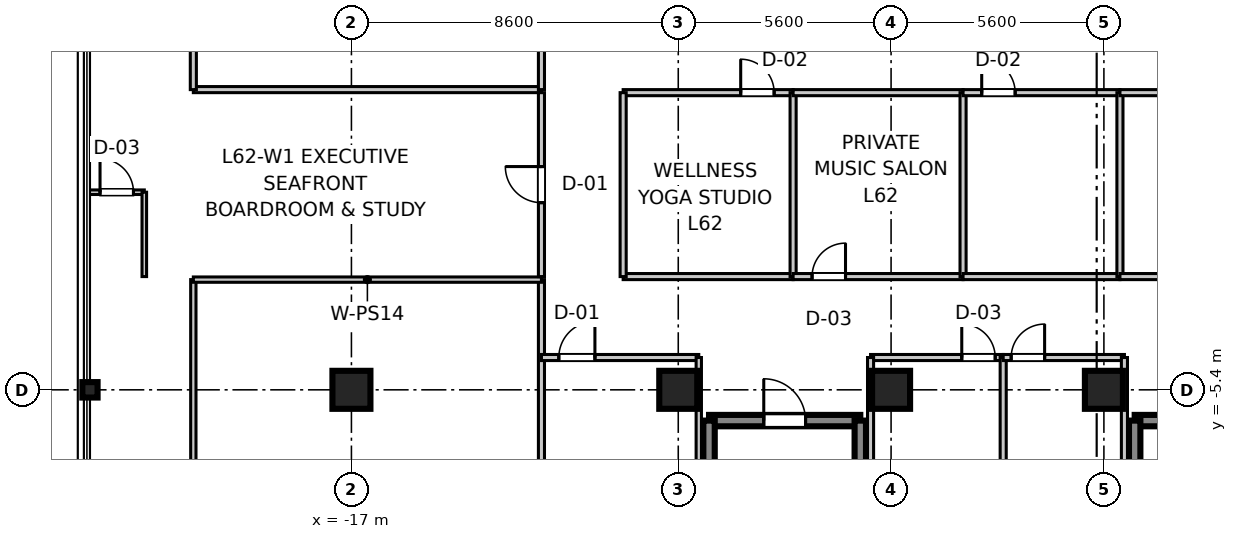
"""IFC4 building model, lengths in metres.
Left out: names, types, materials, properties, quantities, classifications, styles, units other than length and angle.
Written with IfcOpenShell. Run it as: python <this file> out.ifc"""

import sys

from ifc_helpers import new_model, si_unit, direction, frame, frame_2d, origin, origin_2d, place, context, subcontext, project, spatial, rectangle, i_section, extrude, source, transform, mapped, element, fill, save


model = new_model("IFC4")
c1 = context("Model", 3, precision=1e-05, world=origin(), true_north=direction((0.0, 1.0)))
c2 = subcontext(c1, "Body", "Model", "MODEL_VIEW")
j1 = project(units=[si_unit("LENGTHUNIT", "METRE"), si_unit("PLANEANGLEUNIT", "RADIAN")], contexts=[c1])
p1 = place(None, origin())
s1 = spatial("IfcSite", under=j1, at=p1, CompositionType="ELEMENT")
p2 = place(p1, origin())
s2 = spatial("IfcBuilding", under=s1, at=p2, CompositionType="ELEMENT")
p3 = place(p2, frame((0.0, 0.0, 241.9)))
s3 = spatial("IfcBuildingStorey", under=s2, at=p3, CompositionType="ELEMENT", Elevation=241.9)
m1 = source(origin(), c2, "Body", "SweptSolid", [
    extrude(rectangle(XDim=1.0, YDim=1.0, at=origin_2d()), origin(), (0.0, 0.0, 1.0), 3.655),
])
for number, where, z_axis, x_axis in (
    (1, (-17.0, -5.4, 0.0), (0.0, 0.0, 1.0), (1.0, 0.0, 0.0)),
    (2, (-8.4, -5.4, 0.0), (0.0, 0.0, 1.0), (1.0, 0.0, 0.0)),
    (3, (-2.8, -5.4, 0.0), (0.0, 0.0, 1.0), (1.0, 0.0, 0.0)),
    (4, (2.8, -5.4, 0.0), (0.0, 0.0, 1.0), (1.0, 0.0, 0.0)),
):
    element("IfcColumn", number, at=place(p3, frame(where, z_axis=z_axis, x_axis=x_axis)), inside=s3, PredefinedType="COLUMN", context=c2, shape_type="MappedRepresentation", body=[
        mapped(m1, transform((0.0, 0.0, 0.0), scale=1.0)),
    ])
m2 = source(origin(), c2, "Body", "SweptSolid", [
    extrude(i_section(OverallWidth=0.401, OverallDepth=0.406, WebThickness=0.016, FlangeThickness=0.025, at=origin_2d()), origin(), (0.0, 0.0, 1.0), 3.655),
])
p4 = place(p3, frame((-23.88, -5.4, 0.0), z_axis=(0.0, 0.0, 1.0), x_axis=(1.0, 0.0, 0.0)))
e5 = element("IfcColumn", 5, at=p4, inside=s3, PredefinedType="COLUMN", context=c2, shape_type="MappedRepresentation", body=[
    mapped(m2, transform((0.0, 0.0, 0.0), scale=1.0)),
])
m3 = source(origin(), c2, "Body", "SweptSolid", [
    extrude(rectangle(XDim=3.98, YDim=0.3, at=frame_2d((1.99, 0.0))), origin(), (0.0, 0.0, 1.0), 3.41),
])
p5 = place(p3, frame((3.61, -6.21, 0.0), z_axis=(0.0, 0.0, 1.0), x_axis=(1.0, 0.0, 0.0)))
e6 = element("IfcWall", 6, at=p5, inside=s3, PredefinedType="SHEAR", context=c2, shape_type="MappedRepresentation", body=[
    mapped(m3, transform((0.0, 0.0, 0.0), scale=1.0)),
])
m4 = source(origin(), c2, "Body", "SweptSolid", [
    extrude(rectangle(XDim=9.38, YDim=0.3, at=frame_2d((4.69, 0.0))), origin(), (0.0, 0.0, 1.0), 3.41),
])
p6 = place(p3, frame((3.61, -15.59, 0.0), z_axis=(0.0, 0.0, 1.0), x_axis=(0.0, 1.0, 0.0)))
e7 = element("IfcWall", 7, at=p6, inside=s3, PredefinedType="SHEAR", context=c2, shape_type="MappedRepresentation", body=[
    mapped(m4, transform((0.0, 0.0, 0.0), scale=1.0)),
])
p7 = place(p3, frame((-7.59, -6.21, 0.0), z_axis=(0.0, 0.0, 1.0), x_axis=(1.0, 0.0, 0.0)))
e8 = element("IfcWall", 8, at=p7, inside=s3, PredefinedType="SHEAR", context=c2, shape_type="MappedRepresentation", body=[
    mapped(m3, transform((0.0, 0.0, 0.0), scale=1.0)),
])
p8 = place(p7, frame((1.44, 0.0, 0.0)))
e9 = element("IfcOpeningElement", 9, at=p8, cuts=e8, PredefinedType="OPENING", context=c2, shape_type="SweptSolid", body=[
    extrude(rectangle(XDim=1.1, YDim=2.15, at=frame_2d((0.55, 1.075))), frame((0.0, 0.16, 0.0), z_axis=(0.0, -1.0, 0.0), x_axis=(1.0, 0.0, 0.0)), (0.0, 0.0, 1.0), 0.32),
])
for number, where, z_axis, x_axis in (
    (10, (-7.59, -15.59, 0.0), (0.0, 0.0, 1.0), (0.0, 1.0, 0.0)),
    (11, (-3.61, -15.59, 0.0), (0.0, 0.0, 1.0), (0.0, 1.0, 0.0)),
):
    element("IfcWall", number, at=place(p3, frame(where, z_axis=z_axis, x_axis=x_axis)), inside=s3, PredefinedType="SHEAR", context=c2, shape_type="MappedRepresentation", body=[
        mapped(m4, transform((0.0, 0.0, 0.0), scale=1.0)),
    ])
m5 = source(origin(), c2, "Body", "SweptSolid", [
    extrude(rectangle(XDim=9.16, YDim=0.16, at=frame_2d((4.58, 0.0))), origin(), (0.0, 0.0, 1.0), 2.75),
])
p9 = place(p3, frame((-21.16, 2.5, 0.0), z_axis=(0.0, 0.0, 1.0), x_axis=(1.0, 0.0, 0.0)))
e12 = element("IfcWall", 12, at=p9, inside=s3, PredefinedType="PARTITIONING", context=c2, shape_type="MappedRepresentation", body=[
    mapped(m5, transform((0.0, 0.0, 0.0), scale=1.0)),
])
m6 = source(origin(), c2, "Body", "SweptSolid", [
    extrude(rectangle(XDim=10.7, YDim=0.16, at=frame_2d((5.35, 0.0))), origin(), (0.0, 0.0, 1.0), 2.75),
])
p10 = place(p3, frame((-21.16, 2.5, 0.0), z_axis=(0.0, 0.0, 1.0), x_axis=(0.0, 1.0, 0.0)))
e13 = element("IfcWall", 13, at=p10, inside=s3, PredefinedType="PARTITIONING", context=c2, shape_type="MappedRepresentation", body=[
    mapped(m6, transform((0.0, 0.0, 0.0), scale=1.0)),
])
p11 = place(p3, frame((-12.0, 2.5, 0.0), z_axis=(0.0, 0.0, 1.0), x_axis=(0.0, 1.0, 0.0)))
e14 = element("IfcWall", 14, at=p11, inside=s3, PredefinedType="PARTITIONING", context=c2, shape_type="MappedRepresentation", body=[
    mapped(m6, transform((0.0, 0.0, 0.0), scale=1.0)),
])
p12 = place(p11, frame((4.91, 0.0, 0.0)))
e15 = element("IfcOpeningElement", 15, at=p12, cuts=e14, PredefinedType="OPENING", context=c2, shape_type="SweptSolid", body=[
    extrude(rectangle(XDim=0.88, YDim=2.1, at=frame_2d((0.44, 1.05))), frame((0.0, 0.09, 0.0), z_axis=(0.0, -1.0, 0.0), x_axis=(1.0, 0.0, 0.0)), (0.0, 0.0, 1.0), 0.18),
])
m7 = source(origin(), c2, "Body", "SweptSolid", [
    extrude(rectangle(XDim=21.4, YDim=0.16, at=frame_2d((10.7, 0.0))), origin(), (0.0, 0.0, 1.0), 2.75),
])
p13 = place(p3, frame((-12.0, -23.9, 0.0), z_axis=(0.0, 0.0, 1.0), x_axis=(0.0, 1.0, 0.0)))
e16 = element("IfcWall", 16, at=p13, inside=s3, PredefinedType="PARTITIONING", context=c2, shape_type="MappedRepresentation", body=[
    mapped(m7, transform((0.0, 0.0, 0.0), scale=1.0)),
])
p14 = place(p13, frame((12.3, 0.0, 0.0)))
e17 = element("IfcOpeningElement", 17, at=p14, cuts=e16, PredefinedType="OPENING", context=c2, shape_type="SweptSolid", body=[
    extrude(rectangle(XDim=0.95, YDim=2.1, at=frame_2d((0.475, 1.05))), frame((0.0, 0.09, 0.0), z_axis=(0.0, -1.0, 0.0), x_axis=(1.0, 0.0, 0.0)), (0.0, 0.0, 1.0), 0.18),
])
m8 = source(origin(), c2, "Body", "SweptSolid", [
    extrude(rectangle(XDim=19.98, YDim=0.14, at=frame_2d((9.99, 0.0))), origin(), (0.0, 0.0, 1.0), 2.75),
])
p15 = place(p3, frame((-21.16, -22.48, 0.0), z_axis=(0.0, 0.0, 1.0), x_axis=(0.0, 1.0, 0.0)))
e18 = element("IfcWall", 18, at=p15, inside=s3, PredefinedType="PARTITIONING", context=c2, shape_type="MappedRepresentation", body=[
    mapped(m8, transform((0.0, 0.0, 0.0), scale=1.0)),
])
m9 = source(origin(), c2, "Body", "SweptSolid", [
    extrude(rectangle(XDim=9.16, YDim=0.14, at=frame_2d((4.58, 0.0))), origin(), (0.0, 0.0, 1.0), 2.75),
])
p16 = place(p3, frame((-21.16, -2.5, 0.0), z_axis=(0.0, 0.0, 1.0), x_axis=(1.0, 0.0, 0.0)))
e19 = element("IfcWall", 19, at=p16, inside=s3, PredefinedType="PARTITIONING", context=c2, shape_type="MappedRepresentation", body=[
    mapped(m9, transform((0.0, 0.0, 0.0), scale=1.0)),
])
m10 = source(origin(), c2, "Body", "SweptSolid", [
    extrude(rectangle(XDim=4.14, YDim=0.16, at=frame_2d((2.07, 0.0))), origin(), (0.0, 0.0, 1.0), 2.75),
])
p17 = place(p3, frame((-12.0, -4.55, 0.0), z_axis=(0.0, 0.0, 1.0), x_axis=(1.0, 0.0, 0.0)))
e20 = element("IfcWall", 20, at=p17, inside=s3, PredefinedType="PARTITIONING", context=c2, shape_type="MappedRepresentation", body=[
    mapped(m10, transform((0.0, 0.0, 0.0), scale=1.0)),
])
p18 = place(p17, frame((0.457, 0.0, 0.0)))
e21 = element("IfcOpeningElement", 21, at=p18, cuts=e20, PredefinedType="OPENING", context=c2, shape_type="SweptSolid", body=[
    extrude(rectangle(XDim=0.95, YDim=2.1, at=frame_2d((0.475, 1.05))), frame((0.0, 0.09, 0.0), z_axis=(0.0, -1.0, 0.0), x_axis=(1.0, 0.0, 0.0)), (0.0, 0.0, 1.0), 0.18),
])
m11 = source(origin(), c2, "Body", "SweptSolid", [
    extrude(rectangle(XDim=19.35, YDim=0.14, at=frame_2d((9.675, 0.0))), origin(), (0.0, 0.0, 1.0), 2.75),
])
p19 = place(p3, frame((-7.86, -23.9, 0.0), z_axis=(0.0, 0.0, 1.0), x_axis=(0.0, 1.0, 0.0)))
e22 = element("IfcWall", 22, at=p19, inside=s3, PredefinedType="PARTITIONING", context=c2, shape_type="MappedRepresentation", body=[
    mapped(m11, transform((0.0, 0.0, 0.0), scale=1.0)),
])
m12 = source(origin(), c2, "Body", "SweptSolid", [
    extrude(rectangle(XDim=3.49, YDim=0.16, at=frame_2d((1.745, 0.0))), origin(), (0.0, 0.0, 1.0), 2.75),
])
p20 = place(p3, frame((-3.34, -4.55, 0.0), z_axis=(0.0, 0.0, 1.0), x_axis=(1.0, 0.0, 0.0)))
e23 = element("IfcWall", 23, at=p20, inside=s3, PredefinedType="PARTITIONING", context=c2, shape_type="MappedRepresentation", body=[
    mapped(m12, transform((0.0, 0.0, 0.0), scale=1.0)),
])
p21 = place(p20, frame((2.4, 0.0, 0.0)))
e24 = element("IfcOpeningElement", 24, at=p21, cuts=e23, PredefinedType="OPENING", context=c2, shape_type="SweptSolid", body=[
    extrude(rectangle(XDim=0.88, YDim=2.1, at=frame_2d((0.44, 1.05))), frame((0.0, 0.09, 0.0), z_axis=(0.0, -1.0, 0.0), x_axis=(1.0, 0.0, 0.0)), (0.0, 0.0, 1.0), 0.18),
])
m13 = source(origin(), c2, "Body", "SweptSolid", [
    extrude(rectangle(XDim=19.35, YDim=0.16, at=frame_2d((9.675, 0.0))), origin(), (0.0, 0.0, 1.0), 2.75),
])
for number, where, z_axis, x_axis in (
    (25, (-3.34, -23.9, 0.0), (0.0, 0.0, 1.0), (0.0, 1.0, 0.0)),
    (26, (0.15, -23.9, 0.0), (0.0, 0.0, 1.0), (0.0, 1.0, 0.0)),
):
    element("IfcWall", number, at=place(p3, frame(where, z_axis=z_axis, x_axis=x_axis)), inside=s3, PredefinedType="PARTITIONING", context=c2, shape_type="MappedRepresentation", body=[
        mapped(m13, transform((0.0, 0.0, 0.0), scale=1.0)),
    ])
m14 = source(origin(), c2, "Body", "SweptSolid", [
    extrude(rectangle(XDim=3.19, YDim=0.16, at=frame_2d((1.595, 0.0))), origin(), (0.0, 0.0, 1.0), 2.75),
])
p22 = place(p3, frame((0.15, -4.55, 0.0), z_axis=(0.0, 0.0, 1.0), x_axis=(1.0, 0.0, 0.0)))
e27 = element("IfcWall", 27, at=p22, inside=s3, PredefinedType="PARTITIONING", context=c2, shape_type="MappedRepresentation", body=[
    mapped(m14, transform((0.0, 0.0, 0.0), scale=1.0)),
])
p23 = place(p22, frame((0.21, 0.0, 0.0)))
e28 = element("IfcOpeningElement", 28, at=p23, cuts=e27, PredefinedType="OPENING", context=c2, shape_type="SweptSolid", body=[
    extrude(rectangle(XDim=0.88, YDim=2.1, at=frame_2d((0.44, 1.05))), frame((0.0, 0.09, 0.0), z_axis=(0.0, -1.0, 0.0), x_axis=(1.0, 0.0, 0.0)), (0.0, 0.0, 1.0), 0.18),
])
p24 = place(p3, frame((3.34, -23.9, 0.0), z_axis=(0.0, 0.0, 1.0), x_axis=(0.0, 1.0, 0.0)))
e29 = element("IfcWall", 29, at=p24, inside=s3, PredefinedType="PARTITIONING", context=c2, shape_type="MappedRepresentation", body=[
    mapped(m13, transform((0.0, 0.0, 0.0), scale=1.0)),
])
m15 = source(origin(), c2, "Body", "SweptSolid", [
    extrude(rectangle(XDim=4.84, YDim=0.16, at=frame_2d((2.42, 0.0))), origin(), (0.0, 0.0, 1.0), 2.75),
])
p25 = place(p3, frame((-12.0, -2.42, 0.0), z_axis=(0.0, 0.0, 1.0), x_axis=(0.0, 1.0, 0.0)))
e30 = element("IfcWall", 30, at=p25, inside=s3, PredefinedType="PARTITIONING", context=c2, shape_type="MappedRepresentation", body=[
    mapped(m15, transform((0.0, 0.0, 0.0), scale=1.0)),
])
p26 = place(p25, frame((1.945, 0.0, 0.0)))
e31 = element("IfcOpeningElement", 31, at=p26, cuts=e30, PredefinedType="OPENING", context=c2, shape_type="SweptSolid", body=[
    extrude(rectangle(XDim=0.95, YDim=2.1, at=frame_2d((0.475, 1.05))), frame((0.0, 0.09, 0.0), z_axis=(0.0, -1.0, 0.0), x_axis=(1.0, 0.0, 0.0)), (0.0, 0.0, 1.0), 0.18),
])
m16 = source(origin(), c2, "Body", "SweptSolid", [
    extrude(rectangle(XDim=1.45, YDim=0.12, at=frame_2d((0.725, 0.0))), origin(), (0.0, 0.0, 1.0), 2.75),
])
p27 = place(p3, frame((-23.9, -0.2, 0.0), z_axis=(0.0, 0.0, 1.0), x_axis=(1.0, 0.0, 0.0)))
e32 = element("IfcWall", 32, at=p27, inside=s3, PredefinedType="PARTITIONING", context=c2, shape_type="MappedRepresentation", body=[
    mapped(m16, transform((0.0, 0.0, 0.0), scale=1.0)),
])
p28 = place(p27, frame((0.285, 0.0, 0.0)))
e33 = element("IfcOpeningElement", 33, at=p28, cuts=e32, PredefinedType="OPENING", context=c2, shape_type="SweptSolid", body=[
    extrude(rectangle(XDim=0.88, YDim=2.1, at=frame_2d((0.44, 1.05))), frame((0.0, 0.07, 0.0), z_axis=(0.0, -1.0, 0.0), x_axis=(1.0, 0.0, 0.0)), (0.0, 0.0, 1.0), 0.14),
])
m17 = source(origin(), c2, "Body", "SweptSolid", [
    extrude(rectangle(XDim=2.22, YDim=0.12, at=frame_2d((1.11, 0.0))), origin(), (0.0, 0.0, 1.0), 2.75),
])
p29 = place(p3, frame((-22.45, -2.42, 0.0), z_axis=(0.0, 0.0, 1.0), x_axis=(0.0, 1.0, 0.0)))
e34 = element("IfcWall", 34, at=p29, inside=s3, PredefinedType="PARTITIONING", context=c2, shape_type="MappedRepresentation", body=[
    mapped(m17, transform((0.0, 0.0, 0.0), scale=1.0)),
])
m18 = source(origin(), c2, "Body", "SweptSolid", [
    extrude(rectangle(XDim=4.472, YDim=0.16, at=frame_2d((2.236, 0.0))), origin(), (0.0, 0.0, 1.0), 2.75),
])
p30 = place(p3, frame((-9.85, -2.42, 0.0), z_axis=(0.0, 0.0, 1.0), x_axis=(1.0, 0.0, 0.0)))
e35 = element("IfcWall", 35, at=p30, inside=s3, PredefinedType="PARTITIONING", context=c2, shape_type="MappedRepresentation", body=[
    mapped(m18, transform((0.0, 0.0, 0.0), scale=1.0)),
])
p31 = place(p3, frame((-9.85, 2.42, 0.0), z_axis=(0.0, 0.0, 1.0), x_axis=(1.0, 0.0, 0.0)))
e36 = element("IfcWall", 36, at=p31, inside=s3, PredefinedType="PARTITIONING", context=c2, shape_type="MappedRepresentation", body=[
    mapped(m18, transform((0.0, 0.0, 0.0), scale=1.0)),
])
p32 = place(p31, frame((3.093, 0.0, 0.0)))
e37 = element("IfcOpeningElement", 37, at=p32, cuts=e36, PredefinedType="OPENING", context=c2, shape_type="SweptSolid", body=[
    extrude(rectangle(XDim=0.88, YDim=2.1, at=frame_2d((0.44, 1.05))), frame((0.0, 0.09, 0.0), z_axis=(0.0, -1.0, 0.0), x_axis=(1.0, 0.0, 0.0)), (0.0, 0.0, 1.0), 0.18),
])
for number, where, z_axis, x_axis in (
    (38, (-9.85, -2.42, 0.0), (0.0, 0.0, 1.0), (0.0, 1.0, 0.0)),
    (39, (-5.378, -2.42, 0.0), (0.0, 0.0, 1.0), (0.0, 1.0, 0.0)),
):
    element("IfcWall", number, at=place(p3, frame(where, z_axis=z_axis, x_axis=x_axis)), inside=s3, PredefinedType="PARTITIONING", context=c2, shape_type="MappedRepresentation", body=[
        mapped(m15, transform((0.0, 0.0, 0.0), scale=1.0)),
    ])
m19 = source(origin(), c2, "Body", "SweptSolid", [
    extrude(rectangle(XDim=4.472, YDim=0.16, at=frame_2d((2.236, 0.0))), origin(), (0.0, 0.0, 1.0), 2.75),
])
p33 = place(p3, frame((-5.378, -2.42, 0.0), z_axis=(0.0, 0.0, 1.0), x_axis=(1.0, 0.0, 0.0)))
e40 = element("IfcWall", 40, at=p33, inside=s3, PredefinedType="PARTITIONING", context=c2, shape_type="MappedRepresentation", body=[
    mapped(m19, transform((0.0, 0.0, 0.0), scale=1.0)),
])
p34 = place(p33, frame((0.499, 0.0, 0.0)))
e41 = element("IfcOpeningElement", 41, at=p34, cuts=e40, PredefinedType="OPENING", context=c2, shape_type="SweptSolid", body=[
    extrude(rectangle(XDim=0.88, YDim=2.1, at=frame_2d((0.44, 1.05))), frame((0.0, 0.09, 0.0), z_axis=(0.0, -1.0, 0.0), x_axis=(1.0, 0.0, 0.0)), (0.0, 0.0, 1.0), 0.18),
])
p35 = place(p3, frame((-5.378, 2.42, 0.0), z_axis=(0.0, 0.0, 1.0), x_axis=(1.0, 0.0, 0.0)))
e42 = element("IfcWall", 42, at=p35, inside=s3, PredefinedType="PARTITIONING", context=c2, shape_type="MappedRepresentation", body=[
    mapped(m19, transform((0.0, 0.0, 0.0), scale=1.0)),
])
p36 = place(p3, frame((-0.906, -2.42, 0.0), z_axis=(0.0, 0.0, 1.0), x_axis=(0.0, 1.0, 0.0)))
e43 = element("IfcWall", 43, at=p36, inside=s3, PredefinedType="PARTITIONING", context=c2, shape_type="MappedRepresentation", body=[
    mapped(m15, transform((0.0, 0.0, 0.0), scale=1.0)),
])
m20 = source(origin(), c2, "Body", "SweptSolid", [
    extrude(rectangle(XDim=4.128, YDim=0.16, at=frame_2d((2.064, 0.0))), origin(), (0.0, 0.0, 1.0), 2.75),
])
p37 = place(p3, frame((-0.906, -2.42, 0.0), z_axis=(0.0, 0.0, 1.0), x_axis=(1.0, 0.0, 0.0)))
e44 = element("IfcWall", 44, at=p37, inside=s3, PredefinedType="PARTITIONING", context=c2, shape_type="MappedRepresentation", body=[
    mapped(m20, transform((0.0, 0.0, 0.0), scale=1.0)),
])
p38 = place(p3, frame((-0.906, 2.42, 0.0), z_axis=(0.0, 0.0, 1.0), x_axis=(1.0, 0.0, 0.0)))
e45 = element("IfcWall", 45, at=p38, inside=s3, PredefinedType="PARTITIONING", context=c2, shape_type="MappedRepresentation", body=[
    mapped(m20, transform((0.0, 0.0, 0.0), scale=1.0)),
])
p39 = place(p38, frame((0.491, 0.0, 0.0)))
e46 = element("IfcOpeningElement", 46, at=p39, cuts=e45, PredefinedType="OPENING", context=c2, shape_type="SweptSolid", body=[
    extrude(rectangle(XDim=0.88, YDim=2.1, at=frame_2d((0.44, 1.05))), frame((0.0, 0.09, 0.0), z_axis=(0.0, -1.0, 0.0), x_axis=(1.0, 0.0, 0.0)), (0.0, 0.0, 1.0), 0.18),
])
p40 = place(p3, frame((3.222, -2.42, 0.0), z_axis=(0.0, 0.0, 1.0), x_axis=(0.0, 1.0, 0.0)))
e47 = element("IfcWall", 47, at=p40, inside=s3, PredefinedType="PARTITIONING", context=c2, shape_type="MappedRepresentation", body=[
    mapped(m15, transform((0.0, 0.0, 0.0), scale=1.0)),
])
m21 = source(origin(), c2, "Body", "SweptSolid", [
    extrude(rectangle(XDim=4.128, YDim=0.16, at=frame_2d((2.064, 0.0))), origin(), (0.0, 0.0, 1.0), 2.75),
])
p41 = place(p3, frame((3.222, -2.42, 0.0), z_axis=(0.0, 0.0, 1.0), x_axis=(1.0, 0.0, 0.0)))
e48 = element("IfcWall", 48, at=p41, inside=s3, PredefinedType="PARTITIONING", context=c2, shape_type="MappedRepresentation", body=[
    mapped(m21, transform((0.0, 0.0, 0.0), scale=1.0)),
])
p42 = place(p41, frame((1.933, 0.0, 0.0)))
e49 = element("IfcOpeningElement", 49, at=p42, cuts=e48, PredefinedType="OPENING", context=c2, shape_type="SweptSolid", body=[
    extrude(rectangle(XDim=0.88, YDim=2.1, at=frame_2d((0.44, 1.05))), frame((0.0, 0.09, 0.0), z_axis=(0.0, -1.0, 0.0), x_axis=(1.0, 0.0, 0.0)), (0.0, 0.0, 1.0), 0.18),
])
p43 = place(p3, frame((3.222, 2.42, 0.0), z_axis=(0.0, 0.0, 1.0), x_axis=(1.0, 0.0, 0.0)))
e50 = element("IfcWall", 50, at=p43, inside=s3, PredefinedType="PARTITIONING", context=c2, shape_type="MappedRepresentation", body=[
    mapped(m21, transform((0.0, 0.0, 0.0), scale=1.0)),
])
m22 = source(origin(), c2, "Body", "SweptSolid", [
    extrude(rectangle(XDim=1.1, YDim=2.15, at=frame_2d((0.55, 1.075))), frame((0.0, 0.025, 0.0), z_axis=(0.0, -1.0, 0.0), x_axis=(1.0, 0.0, 0.0)), (0.0, 0.0, 1.0), 0.05),
])
p44 = place(p8, frame((1.1, 0.0, 0.0), z_axis=(0.0, 0.0, 1.0), x_axis=(-1.0, 0.0, 0.0)))
e51 = element("IfcDoor", 51, at=p44, inside=s3, OperationType="SINGLE_SWING_LEFT", PredefinedType="DOOR", context=c2, shape_type="MappedRepresentation", body=[
    mapped(m22, transform((0.0, 0.0, 0.0), scale=1.0)),
])
fill(e9, e51)
m23 = source(origin(), c2, "Body", "SweptSolid", [
    extrude(rectangle(XDim=0.95, YDim=2.1, at=frame_2d((0.475, 1.05))), frame((0.0, 0.025, 0.0), z_axis=(0.0, -1.0, 0.0), x_axis=(1.0, 0.0, 0.0)), (0.0, 0.0, 1.0), 0.05),
])
p45 = place(p18, frame((0.95, 0.0, 0.0), z_axis=(0.0, 0.0, 1.0), x_axis=(-1.0, 0.0, 0.0)))
e52 = element("IfcDoor", 52, at=p45, inside=s3, OperationType="SINGLE_SWING_RIGHT", PredefinedType="DOOR", context=c2, shape_type="MappedRepresentation", body=[
    mapped(m23, transform((0.0, 0.0, 0.0), scale=1.0)),
])
fill(e21, e52)
m24 = source(origin(), c2, "Body", "SweptSolid", [
    extrude(rectangle(XDim=0.88, YDim=2.1, at=frame_2d((0.44, 1.05))), frame((0.0, 0.025, 0.0), z_axis=(0.0, -1.0, 0.0), x_axis=(1.0, 0.0, 0.0)), (0.0, 0.0, 1.0), 0.05),
])
p46 = place(p21, frame((0.88, 0.0, 0.0), z_axis=(0.0, 0.0, 1.0), x_axis=(-1.0, 0.0, 0.0)))
e53 = element("IfcDoor", 53, at=p46, inside=s3, OperationType="SINGLE_SWING_LEFT", PredefinedType="DOOR", context=c2, shape_type="MappedRepresentation", body=[
    mapped(m24, transform((0.0, 0.0, 0.0), scale=1.0)),
])
fill(e24, e53)
p47 = place(p23, frame((0.88, 0.0, 0.0), z_axis=(0.0, 0.0, 1.0), x_axis=(-1.0, 0.0, 0.0)))
e54 = element("IfcDoor", 54, at=p47, inside=s3, OperationType="SINGLE_SWING_RIGHT", PredefinedType="DOOR", context=c2, shape_type="MappedRepresentation", body=[
    mapped(m24, transform((0.0, 0.0, 0.0), scale=1.0)),
])
fill(e28, e54)
p48 = place(p28, frame((0.88, 0.0, 0.0), z_axis=(0.0, 0.0, 1.0), x_axis=(-1.0, 0.0, 0.0)))
e55 = element("IfcDoor", 55, at=p48, inside=s3, OperationType="SINGLE_SWING_LEFT", PredefinedType="DOOR", context=c2, shape_type="MappedRepresentation", body=[
    mapped(m24, transform((0.0, 0.0, 0.0), scale=1.0)),
])
fill(e33, e55)
p49 = place(p26, origin())
e56 = element("IfcDoor", 56, at=p49, inside=s3, OperationType="SINGLE_SWING_RIGHT", PredefinedType="DOOR", context=c2, shape_type="MappedRepresentation", body=[
    mapped(m23, transform((0.0, 0.0, 0.0), scale=1.0)),
])
fill(e31, e56)
p50 = place(p32, frame((0.88, 0.0, 0.0), z_axis=(0.0, 0.0, 1.0), x_axis=(-1.0, 0.0, 0.0)))
e57 = element("IfcDoor", 57, at=p50, inside=s3, OperationType="SINGLE_SWING_LEFT", PredefinedType="DOOR", context=c2, shape_type="MappedRepresentation", body=[
    mapped(m24, transform((0.0, 0.0, 0.0), scale=1.0)),
])
fill(e37, e57)
p51 = place(p34, origin())
e58 = element("IfcDoor", 58, at=p51, inside=s3, OperationType="SINGLE_SWING_RIGHT", PredefinedType="DOOR", context=c2, shape_type="MappedRepresentation", body=[
    mapped(m24, transform((0.0, 0.0, 0.0), scale=1.0)),
])
fill(e41, e58)
p52 = place(p39, frame((0.88, 0.0, 0.0), z_axis=(0.0, 0.0, 1.0), x_axis=(-1.0, 0.0, 0.0)))
e59 = element("IfcDoor", 59, at=p52, inside=s3, OperationType="SINGLE_SWING_LEFT", PredefinedType="DOOR", context=c2, shape_type="MappedRepresentation", body=[
    mapped(m24, transform((0.0, 0.0, 0.0), scale=1.0)),
])
fill(e46, e59)
save(model, sys.argv[1])
